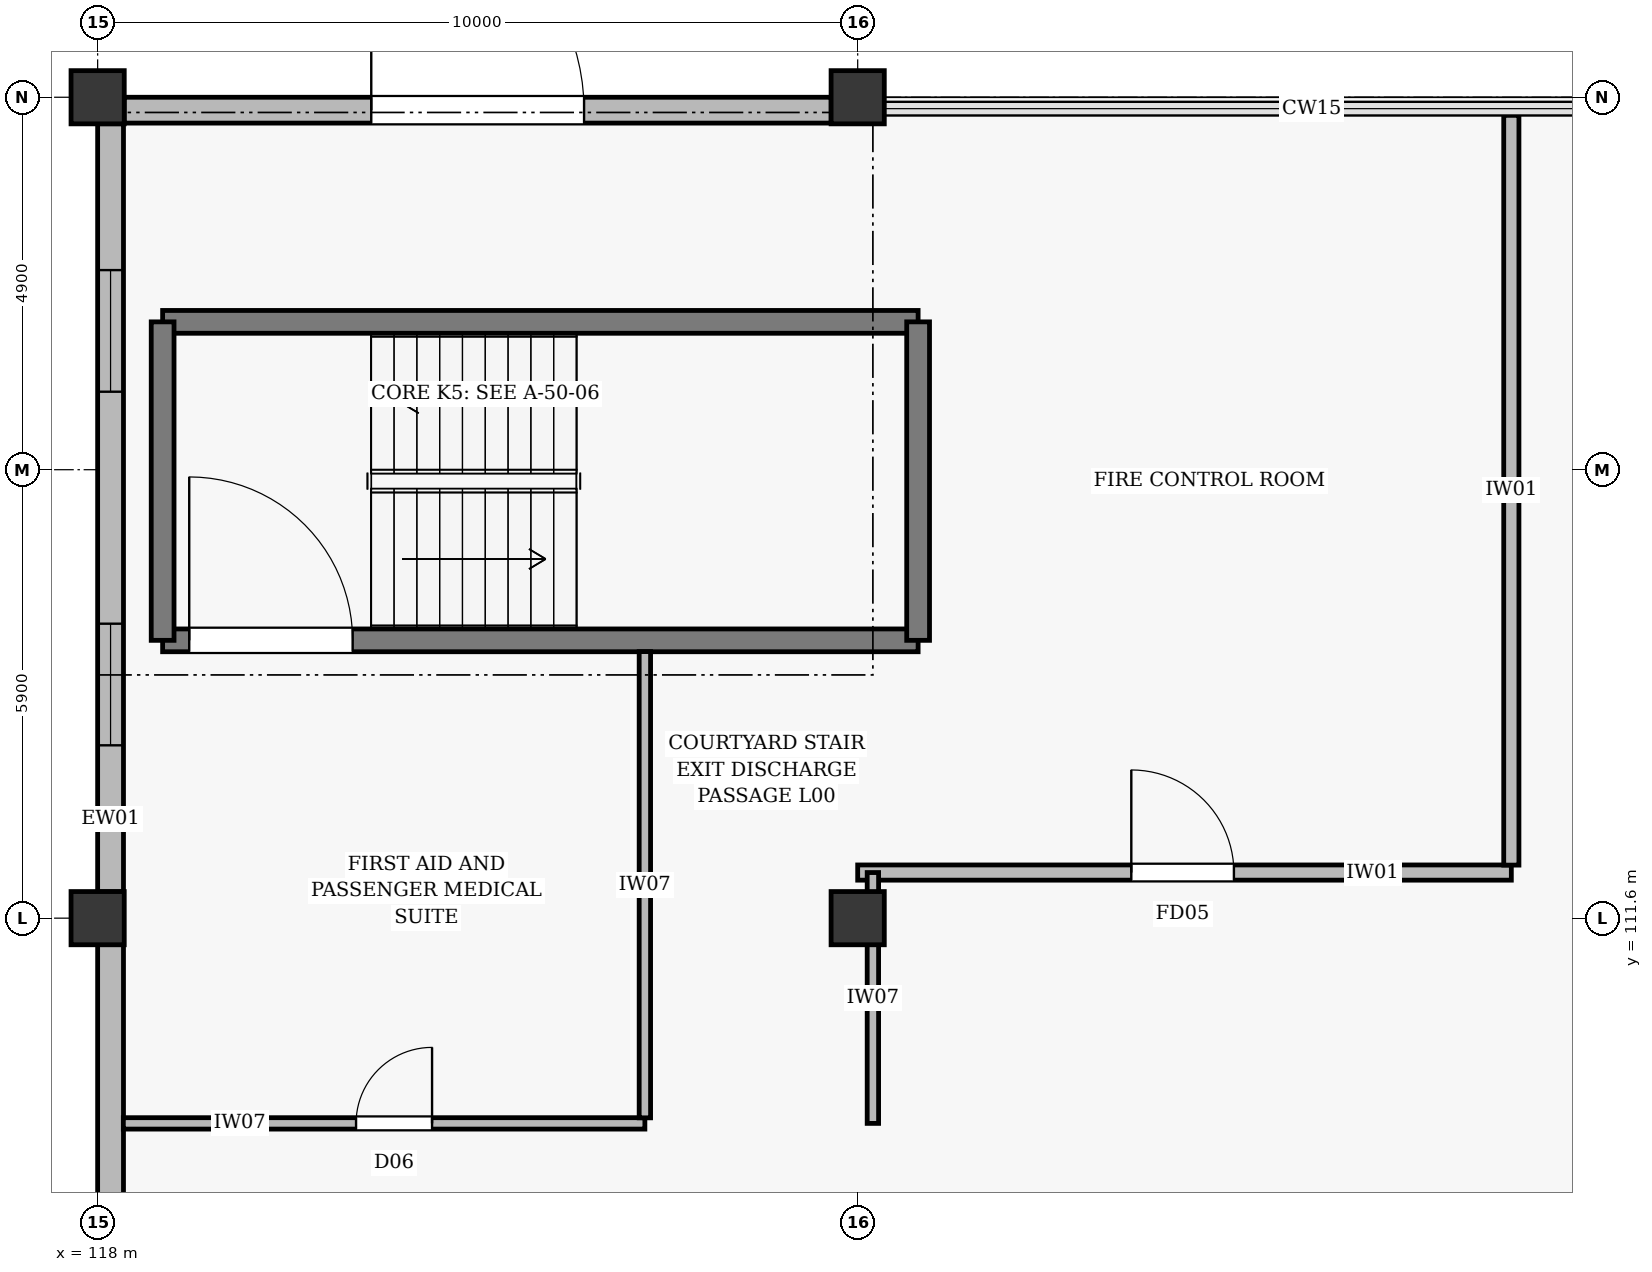
"""IFC4 building model, lengths in metres.
Left out: names, types, materials, properties, quantities, classifications, styles, units other than length and angle.
Written with IfcOpenShell. Run it as: python <this file> out.ifc"""

import sys

from ifc_helpers import new_model, si_unit, direction, frame, frame_2d, origin, origin_2d, place, context, subcontext, project, spatial, rectangle, extrude, element, fill, save


model = new_model("IFC4")
c1 = context("Model", 3, precision=1e-05, world=origin(), true_north=direction((0.0, 1.0)))
c2 = subcontext(c1, "Body", "Model", "MODEL_VIEW")
j1 = project(units=[si_unit("LENGTHUNIT", "METRE"), si_unit("PLANEANGLEUNIT", "RADIAN")], contexts=[c1])
p1 = place(None, origin())
s1 = spatial("IfcSite", under=j1, at=p1, CompositionType="ELEMENT")
p2 = place(p1, origin())
s2 = spatial("IfcBuilding", under=s1, at=p2, CompositionType="ELEMENT")
p3 = place(p2, origin())
s3 = spatial("IfcBuildingStorey", under=s2, at=p3, CompositionType="ELEMENT", Elevation=0.0)
for number, where, z_axis, x_axis in (
    (1, (118.0, 111.6, 0.0), (0.0, 0.0, 1.0), (1.0, 0.0, 0.0)),
    (2, (118.0, 122.4, 0.0), (0.0, 0.0, 1.0), (1.0, 0.0, 0.0)),
    (3, (128.0, 111.6, 0.0), (0.0, 0.0, 1.0), (1.0, 0.0, 0.0)),
    (4, (128.0, 122.4, 0.0), (0.0, 0.0, 1.0), (1.0, 0.0, 0.0)),
):
    element("IfcColumn", number, at=place(p3, frame(where, z_axis=z_axis, x_axis=x_axis)), inside=s3, PredefinedType="COLUMN", context=c2, shape_type="SweptSolid", body=[
        extrude(rectangle(XDim=0.7, YDim=0.7, at=origin_2d()), origin(), (0.0, 0.0, 1.0), 6.6),
    ])
p4 = place(p3, frame((118.348, 122.23, 0.0), z_axis=(0.0, 0.0, 1.0), x_axis=(1.0, 0.0, 0.0)))
e5 = element("IfcWall", 5, at=p4, inside=s3, PredefinedType="STANDARD", context=c2, shape_type="SweptSolid", body=[
    extrude(rectangle(XDim=9.304, YDim=0.34, at=frame_2d((4.652, 0.0))), origin(), (0.0, 0.0, 1.0), 5.75),
])
p5 = place(p4, frame((3.252, 0.0, 0.005)))
e6 = element("IfcOpeningElement", 6, at=p5, cuts=e5, PredefinedType="OPENING", context=c2, shape_type="SweptSolid", body=[
    extrude(rectangle(XDim=2.8, YDim=2.7, at=frame_2d((1.4, 1.35))), frame((0.0, 0.182, 0.0), z_axis=(0.0, -1.0, 0.0), x_axis=(1.0, 0.0, 0.0)), (0.0, 0.0, 1.0), 0.364),
])
p6 = place(p3, frame((118.17, 101.148, 0.0), z_axis=(0.0, 0.0, 1.0), x_axis=(0.0, 1.0, 0.0)))
e7 = element("IfcWall", 7, at=p6, inside=s3, PredefinedType="STANDARD", context=c2, shape_type="SweptSolid", body=[
    extrude(rectangle(XDim=10.104, YDim=0.34, at=frame_2d((5.052, 0.0))), origin(), (0.0, 0.0, 1.0), 5.75),
])
p7 = place(p6, frame((3.6, 0.0, 0.005)))
e8 = element("IfcOpeningElement", 8, at=p7, cuts=e7, PredefinedType="OPENING", context=c2, shape_type="SweptSolid", body=[
    extrude(rectangle(XDim=3.0, YDim=2.8, at=frame_2d((1.5, 1.4))), frame((0.0, 0.182, 0.0), z_axis=(0.0, -1.0, 0.0), x_axis=(1.0, 0.0, 0.0)), (0.0, 0.0, 1.0), 0.364),
])
p8 = place(p3, frame((118.17, 111.948, 0.0), z_axis=(0.0, 0.0, 1.0), x_axis=(0.0, 1.0, 0.0)))
e9 = element("IfcWall", 9, at=p8, inside=s3, PredefinedType="STANDARD", context=c2, shape_type="SweptSolid", body=[
    extrude(rectangle(XDim=10.104, YDim=0.34, at=frame_2d((5.052, 0.0))), origin(), (0.0, 0.0, 1.0), 5.75),
])
p9 = place(p8, frame((1.926, 0.0, 0.75)))
e10 = element("IfcOpeningElement", 10, at=p9, cuts=e9, PredefinedType="OPENING", context=c2, shape_type="SweptSolid", body=[
    extrude(rectangle(XDim=1.6, YDim=2.1, at=frame_2d((0.8, 1.05))), frame((0.0, 0.182, 0.0), z_axis=(0.0, -1.0, 0.0), x_axis=(1.0, 0.0, 0.0)), (0.0, 0.0, 1.0), 0.364),
])
p10 = place(p8, frame((6.578, 0.0, 0.75)))
e11 = element("IfcOpeningElement", 11, at=p10, cuts=e9, PredefinedType="OPENING", context=c2, shape_type="SweptSolid", body=[
    extrude(rectangle(XDim=1.6, YDim=2.1, at=frame_2d((0.8, 1.05))), frame((0.0, 0.182, 0.0), z_axis=(0.0, -1.0, 0.0), x_axis=(1.0, 0.0, 0.0)), (0.0, 0.0, 1.0), 0.364),
])
p11 = place(p3, frame((118.855, 115.255, 0.0), z_axis=(0.0, 0.0, 1.0), x_axis=(1.0, 0.0, 0.0)))
e12 = element("IfcWall", 12, at=p11, inside=s3, PredefinedType="SOLIDWALL", context=c2, shape_type="SweptSolid", body=[
    extrude(rectangle(XDim=9.94, YDim=0.3, at=frame_2d((4.97, 0.0))), origin(), (0.0, 0.0, 1.0), 6.6),
])
p12 = place(p11, frame((0.35, 0.0, 0.005)))
e13 = element("IfcOpeningElement", 13, at=p12, cuts=e12, PredefinedType="OPENING", context=c2, shape_type="SweptSolid", body=[
    extrude(rectangle(XDim=2.15, YDim=2.2, at=frame_2d((1.075, 1.1))), frame((0.0, 0.162, 0.0), z_axis=(0.0, -1.0, 0.0), x_axis=(1.0, 0.0, 0.0)), (0.0, 0.0, 1.0), 0.324),
])
p13 = place(p3, frame((118.855, 119.445, 0.0), z_axis=(0.0, 0.0, 1.0), x_axis=(1.0, 0.0, 0.0)))
e14 = element("IfcWall", 14, at=p13, inside=s3, PredefinedType="SOLIDWALL", context=c2, shape_type="SweptSolid", body=[
    extrude(rectangle(XDim=9.94, YDim=0.3, at=frame_2d((4.97, 0.0))), origin(), (0.0, 0.0, 1.0), 6.6),
])
for number, where, z_axis, x_axis in (
    (15, (118.855, 115.255, 0.0), (0.0, 0.0, 1.0), (0.0, 1.0, 0.0)),
    (16, (128.795, 115.255, 0.0), (0.0, 0.0, 1.0), (0.0, 1.0, 0.0)),
):
    element("IfcWall", number, at=place(p3, frame(where, z_axis=z_axis, x_axis=x_axis)), inside=s3, PredefinedType="SOLIDWALL", context=c2, shape_type="SweptSolid", body=[
        extrude(rectangle(XDim=4.19, YDim=0.3, at=frame_2d((2.095, 0.0))), origin(), (0.0, 0.0, 1.0), 6.6),
    ])
p14 = place(p3, frame((128.0, 112.2, 0.0), z_axis=(0.0, 0.0, 1.0), x_axis=(1.0, 0.0, 0.0)))
e17 = element("IfcWall", 17, at=p14, inside=s3, PredefinedType="PARTITIONING", context=c2, shape_type="SweptSolid", body=[
    extrude(rectangle(XDim=8.6, YDim=0.2, at=frame_2d((4.3, 0.0))), origin(), (0.0, 0.0, 1.0), 6.0),
])
p15 = place(p14, frame((3.6, 0.0, 0.005)))
e18 = element("IfcOpeningElement", 18, at=p15, cuts=e17, PredefinedType="OPENING", context=c2, shape_type="SweptSolid", body=[
    extrude(rectangle(XDim=1.35, YDim=2.15, at=frame_2d((0.675, 1.075))), frame((0.0, 0.112, 0.0), z_axis=(0.0, -1.0, 0.0), x_axis=(1.0, 0.0, 0.0)), (0.0, 0.0, 1.0), 0.224),
])
p16 = place(p3, frame((136.6, 112.298, 0.0), z_axis=(0.0, 0.0, 1.0), x_axis=(0.0, 1.0, 0.0)))
e19 = element("IfcWall", 19, at=p16, inside=s3, PredefinedType="PARTITIONING", context=c2, shape_type="SweptSolid", body=[
    extrude(rectangle(XDim=9.864, YDim=0.2, at=frame_2d((4.932, 0.0))), origin(), (0.0, 0.0, 1.0), 6.0),
])
p17 = place(p3, frame((118.338, 108.9, 0.0), z_axis=(0.0, 0.0, 1.0), x_axis=(1.0, 0.0, 0.0)))
e20 = element("IfcWall", 20, at=p17, inside=s3, PredefinedType="PARTITIONING", context=c2, shape_type="SweptSolid", body=[
    extrude(rectangle(XDim=6.862, YDim=0.15, at=frame_2d((3.431, 0.0))), origin(), (0.0, 0.0, 1.0), 5.89),
])
p18 = place(p17, frame((3.062, 0.0, 0.005)))
e21 = element("IfcOpeningElement", 21, at=p18, cuts=e20, PredefinedType="OPENING", context=c2, shape_type="SweptSolid", body=[
    extrude(rectangle(XDim=1.0, YDim=2.1, at=frame_2d((0.5, 1.05))), frame((0.0, 0.087, 0.0), z_axis=(0.0, -1.0, 0.0), x_axis=(1.0, 0.0, 0.0)), (0.0, 0.0, 1.0), 0.174),
])
p19 = place(p3, frame((125.2, 108.973, 0.0), z_axis=(0.0, 0.0, 1.0), x_axis=(0.0, 1.0, 0.0)))
e22 = element("IfcWall", 22, at=p19, inside=s3, PredefinedType="PARTITIONING", context=c2, shape_type="SweptSolid", body=[
    extrude(rectangle(XDim=6.134, YDim=0.15, at=frame_2d((3.067, 0.0))), origin(), (0.0, 0.0, 1.0), 5.84),
])
p20 = place(p3, frame((128.2, 108.9, 0.0), z_axis=(0.0, 0.0, 1.0), x_axis=(0.0, 1.0, 0.0)))
e23 = element("IfcWall", 23, at=p20, inside=s3, PredefinedType="PARTITIONING", context=c2, shape_type="SweptSolid", body=[
    extrude(rectangle(XDim=3.3, YDim=0.15, at=frame_2d((1.65, 0.0))), origin(), (0.0, 0.0, 1.0), 5.84),
])
p21 = place(p5, origin())
e24 = element("IfcDoor", 24, at=p21, inside=s3, OperationType="DOUBLE_DOOR_SINGLE_SWING", PredefinedType="DOOR", context=c2, shape_type="SweptSolid", body=[
    extrude(rectangle(XDim=2.8, YDim=2.7, at=frame_2d((1.4, 1.35))), frame((0.0, 0.025, 0.0), z_axis=(0.0, -1.0, 0.0), x_axis=(1.0, 0.0, 0.0)), (0.0, 0.0, 1.0), 0.05),
])
fill(e6, e24)
p22 = place(p9, origin())
e25 = element("IfcWindow", 25, at=p22, inside=s3, PartitioningType="DOUBLE_PANEL_VERTICAL", PredefinedType="WINDOW", context=c2, shape_type="SweptSolid", body=[
    extrude(rectangle(XDim=1.6, YDim=2.1, at=frame_2d((0.8, 1.05))), frame((0.0, 0.03, 0.0), z_axis=(0.0, -1.0, 0.0), x_axis=(1.0, 0.0, 0.0)), (0.0, 0.0, 1.0), 0.06),
])
fill(e10, e25)
p23 = place(p10, origin())
e26 = element("IfcWindow", 26, at=p23, inside=s3, PartitioningType="DOUBLE_PANEL_VERTICAL", PredefinedType="WINDOW", context=c2, shape_type="SweptSolid", body=[
    extrude(rectangle(XDim=1.6, YDim=2.1, at=frame_2d((0.8, 1.05))), frame((0.0, 0.03, 0.0), z_axis=(0.0, -1.0, 0.0), x_axis=(1.0, 0.0, 0.0)), (0.0, 0.0, 1.0), 0.06),
])
fill(e11, e26)
p24 = place(p12, origin())
e27 = element("IfcDoor", 27, at=p24, inside=s3, OperationType="SINGLE_SWING_LEFT", PredefinedType="DOOR", context=c2, shape_type="SweptSolid", body=[
    extrude(rectangle(XDim=2.15, YDim=2.2, at=frame_2d((1.075, 1.1))), frame((0.0, 0.025, 0.0), z_axis=(0.0, -1.0, 0.0), x_axis=(1.0, 0.0, 0.0)), (0.0, 0.0, 1.0), 0.05),
])
fill(e13, e27)
p25 = place(p15, origin())
e28 = element("IfcDoor", 28, at=p25, inside=s3, OperationType="SINGLE_SWING_LEFT", PredefinedType="DOOR", context=c2, shape_type="SweptSolid", body=[
    extrude(rectangle(XDim=1.35, YDim=2.15, at=frame_2d((0.675, 1.075))), frame((0.0, 0.025, 0.0), z_axis=(0.0, -1.0, 0.0), x_axis=(1.0, 0.0, 0.0)), (0.0, 0.0, 1.0), 0.05),
])
fill(e18, e28)
p26 = place(p18, origin())
e29 = element("IfcDoor", 29, at=p26, inside=s3, OperationType="SINGLE_SWING_RIGHT", PredefinedType="DOOR", context=c2, shape_type="SweptSolid", body=[
    extrude(rectangle(XDim=1.0, YDim=2.1, at=frame_2d((0.5, 1.05))), frame((0.0, 0.025, 0.0), z_axis=(0.0, -1.0, 0.0), x_axis=(1.0, 0.0, 0.0)), (0.0, 0.0, 1.0), 0.05),
])
fill(e21, e29)
save(model, sys.argv[1])
